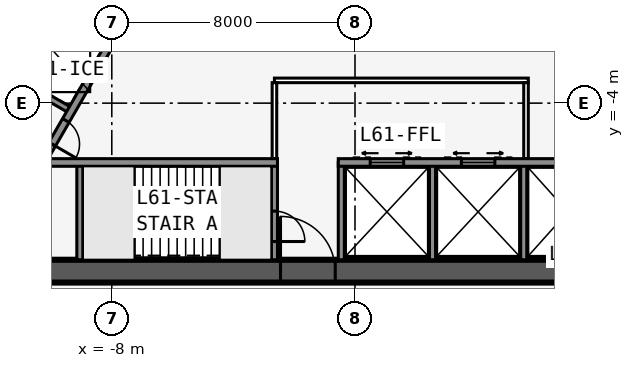
"""IFC4 building model, lengths in metres.
Left out: names, types, materials, properties, quantities, classifications, styles, units other than length and angle.
Written with IfcOpenShell. Run it as: python <this file> out.ifc"""

import sys

from ifc_helpers import new_model, si_unit, direction, frame, frame_2d, origin, place, context, subcontext, project, spatial, rectangle, extrude, element, fill, save


model = new_model("IFC4")
c1 = context("Model", 3, precision=1e-05, world=origin(), true_north=direction((0.0, 1.0)))
c2 = subcontext(c1, "Body", "Model", "MODEL_VIEW")
j1 = project(units=[si_unit("LENGTHUNIT", "METRE"), si_unit("PLANEANGLEUNIT", "RADIAN")], contexts=[c1])
p1 = place(None, origin())
s1 = spatial("IfcSite", under=j1, at=p1, CompositionType="ELEMENT")
p2 = place(p1, origin())
s2 = spatial("IfcBuilding", under=s1, at=p2, CompositionType="ELEMENT")
p3 = place(p2, frame((0.0, 0.0, 229.7)))
s3 = spatial("IfcBuildingStorey", under=s2, at=p3, CompositionType="ELEMENT", Elevation=229.7)
p4 = place(p3, frame((-16.5, -9.526, 0.0), z_axis=(0.0, 0.0, 1.0), x_axis=(1.0, 0.0, 0.0)))
e1 = element("IfcWall", 1, at=p4, inside=s3, PredefinedType="SHEAR", context=c2, shape_type="SweptSolid", body=[
    extrude(rectangle(XDim=33.0, YDim=0.75, at=frame_2d((16.5, 0.0))), origin(), (0.0, 0.0, 1.0), 3.6),
])
p5 = place(p4, frame((14.05, 0.0, 0.0)))
e2 = element("IfcOpeningElement", 2, at=p5, cuts=e1, PredefinedType="OPENING", context=c2, shape_type="SweptSolid", body=[
    extrude(rectangle(XDim=1.8, YDim=2.13, at=frame_2d((0.9, 1.065))), frame((0.0, 0.385, 0.0), z_axis=(0.0, -1.0, 0.0), x_axis=(1.0, 0.0, 0.0)), (0.0, 0.0, 1.0), 0.77),
])
p6 = place(p3, frame((-10.183, -5.951, 0.0), z_axis=(0.0, 0.0, 1.0), x_axis=(1.0, 0.0, 0.0)))
e3 = element("IfcWall", 3, at=p6, inside=s3, PredefinedType="SOLIDWALL", context=c2, shape_type="SweptSolid", body=[
    extrude(rectangle(XDim=7.633, YDim=0.25, at=frame_2d((3.816, 0.0))), origin(), (0.0, 0.0, 1.0), 3.35),
])
p7 = place(p3, frame((-0.55, -5.951, 0.0), z_axis=(0.0, 0.0, 1.0), x_axis=(1.0, 0.0, 0.0)))
e4 = element("IfcWall", 4, at=p7, inside=s3, PredefinedType="SOLIDWALL", context=c2, shape_type="SweptSolid", body=[
    extrude(rectangle(XDim=10.733, YDim=0.25, at=frame_2d((5.366, 0.0))), origin(), (0.0, 0.0, 1.0), 3.35),
])
p8 = place(p7, frame((9.314, 0.0, 0.0)))
e5 = element("IfcOpeningElement", 5, at=p8, cuts=e4, PredefinedType="OPENING", context=c2, shape_type="SweptSolid", body=[
    extrude(rectangle(XDim=0.9, YDim=2.13, at=frame_2d((0.45, 1.065))), frame((0.0, 0.135, 0.0), z_axis=(0.0, -1.0, 0.0), x_axis=(1.0, 0.0, 0.0)), (0.0, 0.0, 1.0), 0.27),
])
p9 = place(p7, frame((1.05, 0.0, 0.0)))
e6 = element("IfcOpeningElement", 6, at=p9, cuts=e4, PredefinedType="OPENING", context=c2, shape_type="SweptSolid", body=[
    extrude(rectangle(XDim=1.1, YDim=2.13, at=frame_2d((0.55, 1.065))), frame((0.0, 0.135, 0.0), z_axis=(0.0, -1.0, 0.0), x_axis=(1.0, 0.0, 0.0)), (0.0, 0.0, 1.0), 0.27),
])
p10 = place(p7, frame((4.05, 0.0, 0.0)))
e7 = element("IfcOpeningElement", 7, at=p10, cuts=e4, PredefinedType="OPENING", context=c2, shape_type="SweptSolid", body=[
    extrude(rectangle(XDim=1.1, YDim=2.13, at=frame_2d((0.55, 1.065))), frame((0.0, 0.135, 0.0), z_axis=(0.0, -1.0, 0.0), x_axis=(1.0, 0.0, 0.0)), (0.0, 0.0, 1.0), 0.27),
])
p11 = place(p3, frame((-9.05, -5.951, 0.0), z_axis=(0.0, 0.0, 1.0), x_axis=(0.0, -1.0, 0.0)))
e8 = element("IfcWall", 8, at=p11, inside=s3, PredefinedType="SOLIDWALL", context=c2, shape_type="SweptSolid", body=[
    extrude(rectangle(XDim=3.2, YDim=0.2, at=frame_2d((1.6, 0.0))), origin(), (0.0, 0.0, 1.0), 3.35),
])
p12 = place(p3, frame((-2.65, -5.951, 0.0), z_axis=(0.0, 0.0, 1.0), x_axis=(0.0, -1.0, 0.0)))
e9 = element("IfcWall", 9, at=p12, inside=s3, PredefinedType="SOLIDWALL", context=c2, shape_type="SweptSolid", body=[
    extrude(rectangle(XDim=3.2, YDim=0.2, at=frame_2d((1.6, 0.0))), origin(), (0.0, 0.0, 1.0), 3.35),
])
p13 = place(p12, frame((1.6, 0.0, 0.0)))
e10 = element("IfcOpeningElement", 10, at=p13, cuts=e9, PredefinedType="OPENING", context=c2, shape_type="SweptSolid", body=[
    extrude(rectangle(XDim=1.0, YDim=2.13, at=frame_2d((0.5, 1.065))), frame((0.0, 0.11, 0.0), z_axis=(0.0, -1.0, 0.0), x_axis=(1.0, 0.0, 0.0)), (0.0, 0.0, 1.0), 0.22),
])
for number, where, z_axis, x_axis in (
    (11, (-0.45, -5.951, 0.0), (0.0, 0.0, 1.0), (0.0, -1.0, 0.0)),
    (12, (2.55, -5.951, 0.0), (0.0, 0.0, 1.0), (0.0, -1.0, 0.0)),
    (13, (5.55, -5.951, 0.0), (0.0, 0.0, 1.0), (0.0, -1.0, 0.0)),
):
    element("IfcWall", number, at=place(p3, frame(where, z_axis=z_axis, x_axis=x_axis)), inside=s3, PredefinedType="SOLIDWALL", context=c2, shape_type="SweptSolid", body=[
        extrude(rectangle(XDim=3.2, YDim=0.2, at=frame_2d((1.6, 0.0))), origin(), (0.0, 0.0, 1.0), 3.35),
    ])
p14 = place(p3, frame((16.5, -9.526, 0.0), z_axis=(0.0, 0.0, 1.0), x_axis=(-0.499999749417, 0.866025548458, 0.0)))
e14 = element("IfcWall", 14, at=p14, inside=s3, PredefinedType="SHEAR", context=c2, shape_type="SweptSolid", body=[
    extrude(rectangle(XDim=33.0, YDim=0.75, at=frame_2d((16.5, 0.0))), origin(), (0.0, 0.0, 1.0), 3.6),
])
p15 = place(p14, frame((14.15, 0.0, 0.0)))
e15 = element("IfcOpeningElement", 15, at=p15, cuts=e14, PredefinedType="OPENING", context=c2, shape_type="SweptSolid", body=[
    extrude(rectangle(XDim=1.8, YDim=2.13, at=frame_2d((0.9, 1.065))), frame((0.0, 0.385, 0.0), z_axis=(0.0, -1.0, 0.0), x_axis=(1.0, 0.0, 0.0)), (0.0, 0.0, 1.0), 0.77),
])
p16 = place(p14, frame((12.6, 0.0, 0.0)))
e16 = element("IfcOpeningElement", 16, at=p16, cuts=e14, PredefinedType="OPENING", context=c2, shape_type="SweptSolid", body=[
    extrude(rectangle(XDim=1.0, YDim=2.13, at=frame_2d((0.5, 1.065))), frame((0.0, 0.385, 0.0), z_axis=(0.0, -1.0, 0.0), x_axis=(1.0, 0.0, 0.0)), (0.0, 0.0, 1.0), 0.77),
])
p17 = place(p3, frame((10.245, -5.843, 0.0), z_axis=(0.0, 0.0, 1.0), x_axis=(-0.499993009313, 0.866029439822, 0.0)))
e17 = element("IfcWall", 17, at=p17, inside=s3, PredefinedType="SOLIDWALL", context=c2, shape_type="SweptSolid", body=[
    extrude(rectangle(XDim=7.733, YDim=0.25, at=frame_2d((3.866, 0.0))), origin(), (0.0, 0.0, 1.0), 3.35),
])
p18 = place(p3, frame((0.0, 19.052, 0.0), z_axis=(0.0, 0.0, 1.0), x_axis=(-0.499999749417, -0.866025548458, 0.0)))
e18 = element("IfcWall", 18, at=p18, inside=s3, PredefinedType="SHEAR", context=c2, shape_type="SweptSolid", body=[
    extrude(rectangle(XDim=33.0, YDim=0.75, at=frame_2d((16.5, 0.0))), origin(), (0.0, 0.0, 1.0), 3.6),
])
p19 = place(p18, frame((14.15, 0.0, 0.0)))
e19 = element("IfcOpeningElement", 19, at=p19, cuts=e18, PredefinedType="OPENING", context=c2, shape_type="SweptSolid", body=[
    extrude(rectangle(XDim=1.8, YDim=2.13, at=frame_2d((0.9, 1.065))), frame((0.0, 0.385, 0.0), z_axis=(0.0, -1.0, 0.0), x_axis=(1.0, 0.0, 0.0)), (0.0, 0.0, 1.0), 0.77),
])
p20 = place(p18, frame((12.6, 0.0, 0.0)))
e20 = element("IfcOpeningElement", 20, at=p20, cuts=e18, PredefinedType="OPENING", context=c2, shape_type="SweptSolid", body=[
    extrude(rectangle(XDim=1.0, YDim=2.13, at=frame_2d((0.5, 1.065))), frame((0.0, 0.385, 0.0), z_axis=(0.0, -1.0, 0.0), x_axis=(1.0, 0.0, 0.0)), (0.0, 0.0, 1.0), 0.77),
])
p21 = place(p3, frame((-4.929, 3.365, 0.0), z_axis=(0.0, 0.0, 1.0), x_axis=(-0.499991433582, -0.866030349552, 0.0)))
e21 = element("IfcWall", 21, at=p21, inside=s3, PredefinedType="SOLIDWALL", context=c2, shape_type="SweptSolid", body=[
    extrude(rectangle(XDim=10.633, YDim=0.25, at=frame_2d((5.316, 0.0))), origin(), (0.0, 0.0, 1.0), 3.35),
])
p22 = place(p21, frame((9.164, 0.0, 0.0)))
e22 = element("IfcOpeningElement", 22, at=p22, cuts=e21, PredefinedType="OPENING", context=c2, shape_type="SweptSolid", body=[
    extrude(rectangle(XDim=0.9, YDim=2.13, at=frame_2d((0.45, 1.065))), frame((0.0, 0.135, 0.0), z_axis=(0.0, -1.0, 0.0), x_axis=(1.0, 0.0, 0.0)), (0.0, 0.0, 1.0), 0.27),
])
p23 = place(p21, frame((1.1, 0.0, 0.0)))
e23 = element("IfcOpeningElement", 23, at=p23, cuts=e21, PredefinedType="OPENING", context=c2, shape_type="SweptSolid", body=[
    extrude(rectangle(XDim=0.9, YDim=2.13, at=frame_2d((0.45, 1.065))), frame((0.0, 0.135, 0.0), z_axis=(0.0, -1.0, 0.0), x_axis=(1.0, 0.0, 0.0)), (0.0, 0.0, 1.0), 0.27),
])
p24 = place(p21, frame((4.0, 0.0, 0.0)))
e24 = element("IfcOpeningElement", 24, at=p24, cuts=e21, PredefinedType="OPENING", context=c2, shape_type="SweptSolid", body=[
    extrude(rectangle(XDim=0.9, YDim=2.13, at=frame_2d((0.45, 1.065))), frame((0.0, 0.135, 0.0), z_axis=(0.0, -1.0, 0.0), x_axis=(1.0, 0.0, 0.0)), (0.0, 0.0, 1.0), 0.27),
])
p25 = place(p3, frame((-9.329, -4.256, 0.0), z_axis=(0.0, 0.0, 1.0), x_axis=(-0.866022944154, 0.50000426018, 0.0)))
e25 = element("IfcWall", 25, at=p25, inside=s3, PredefinedType="SOLIDWALL", context=c2, shape_type="SweptSolid", body=[
    extrude(rectangle(XDim=3.2, YDim=0.2, at=frame_2d((1.6, 0.0))), origin(), (0.0, 0.0, 1.0), 3.35),
])
p26 = place(p3, frame((20.102, -11.115, 0.0), z_axis=(0.0, 0.0, 1.0), x_axis=(-0.500000265775, 0.866025250339, 0.0)))
e26 = element("IfcWall", 26, at=p26, inside=s3, PredefinedType="PARTITIONING", context=c2, shape_type="SweptSolid", body=[
    extrude(rectangle(XDim=39.354, YDim=0.15, at=frame_2d((19.677, 0.0))), origin(), (0.0, 0.0, 1.0), 3.35),
])
p27 = place(p26, frame((1.102, 0.0, 0.0)))
e27 = element("IfcOpeningElement", 27, at=p27, cuts=e26, PredefinedType="OPENING", context=c2, shape_type="SweptSolid", body=[
    extrude(rectangle(XDim=0.95, YDim=2.13, at=frame_2d((0.475, 1.065))), frame((0.0, 0.085, 0.0), z_axis=(0.0, -1.0, 0.0), x_axis=(1.0, 0.0, 0.0)), (0.0, 0.0, 1.0), 0.17),
])
p28 = place(p26, frame((11.702, 0.0, 0.0)))
e28 = element("IfcOpeningElement", 28, at=p28, cuts=e26, PredefinedType="OPENING", context=c2, shape_type="SweptSolid", body=[
    extrude(rectangle(XDim=0.95, YDim=2.13, at=frame_2d((0.475, 1.065))), frame((0.0, 0.085, 0.0), z_axis=(0.0, -1.0, 0.0), x_axis=(1.0, 0.0, 0.0)), (0.0, 0.0, 1.0), 0.17),
])
p29 = place(p26, frame((26.702, 0.0, 0.0)))
e29 = element("IfcOpeningElement", 29, at=p29, cuts=e26, PredefinedType="OPENING", context=c2, shape_type="SweptSolid", body=[
    extrude(rectangle(XDim=0.95, YDim=2.13, at=frame_2d((0.475, 1.065))), frame((0.0, 0.085, 0.0), z_axis=(0.0, -1.0, 0.0), x_axis=(1.0, 0.0, 0.0)), (0.0, 0.0, 1.0), 0.17),
])
p30 = place(p26, frame((37.302, 0.0, 0.0)))
e30 = element("IfcOpeningElement", 30, at=p30, cuts=e26, PredefinedType="OPENING", context=c2, shape_type="SweptSolid", body=[
    extrude(rectangle(XDim=0.95, YDim=2.13, at=frame_2d((0.475, 1.065))), frame((0.0, 0.085, 0.0), z_axis=(0.0, -1.0, 0.0), x_axis=(1.0, 0.0, 0.0)), (0.0, 0.0, 1.0), 0.17),
])
p31 = place(p3, frame((-0.425, 22.966, 0.0), z_axis=(0.0, 0.0, 1.0), x_axis=(-0.500000265775, -0.866025250339, 0.0)))
e31 = element("IfcWall", 31, at=p31, inside=s3, PredefinedType="PARTITIONING", context=c2, shape_type="SweptSolid", body=[
    extrude(rectangle(XDim=39.354, YDim=0.15, at=frame_2d((19.677, 0.0))), origin(), (0.0, 0.0, 1.0), 3.35),
])
p32 = place(p31, frame((1.665, 0.0, 0.0)))
e32 = element("IfcOpeningElement", 32, at=p32, cuts=e31, PredefinedType="OPENING", context=c2, shape_type="SweptSolid", body=[
    extrude(rectangle(XDim=0.95, YDim=2.13, at=frame_2d((0.475, 1.065))), frame((0.0, 0.085, 0.0), z_axis=(0.0, -1.0, 0.0), x_axis=(1.0, 0.0, 0.0)), (0.0, 0.0, 1.0), 0.17),
])
p33 = place(p31, frame((11.702, 0.0, 0.0)))
e33 = element("IfcOpeningElement", 33, at=p33, cuts=e31, PredefinedType="OPENING", context=c2, shape_type="SweptSolid", body=[
    extrude(rectangle(XDim=0.95, YDim=2.13, at=frame_2d((0.475, 1.065))), frame((0.0, 0.085, 0.0), z_axis=(0.0, -1.0, 0.0), x_axis=(1.0, 0.0, 0.0)), (0.0, 0.0, 1.0), 0.17),
])
p34 = place(p31, frame((21.702, 0.0, 0.0)))
e34 = element("IfcOpeningElement", 34, at=p34, cuts=e31, PredefinedType="OPENING", context=c2, shape_type="SweptSolid", body=[
    extrude(rectangle(XDim=0.95, YDim=2.13, at=frame_2d((0.475, 1.065))), frame((0.0, 0.085, 0.0), z_axis=(0.0, -1.0, 0.0), x_axis=(1.0, 0.0, 0.0)), (0.0, 0.0, 1.0), 0.17),
])
p35 = place(p31, frame((36.739, 0.0, 0.0)))
e35 = element("IfcOpeningElement", 35, at=p35, cuts=e31, PredefinedType="OPENING", context=c2, shape_type="SweptSolid", body=[
    extrude(rectangle(XDim=0.95, YDim=2.13, at=frame_2d((0.475, 1.065))), frame((0.0, 0.085, 0.0), z_axis=(0.0, -1.0, 0.0), x_axis=(1.0, 0.0, 0.0)), (0.0, 0.0, 1.0), 0.17),
])
p36 = place(p3, frame((-2.65, -3.251, 0.0), z_axis=(0.0, 0.0, 1.0), x_axis=(1.0, 0.0, 0.0)))
e36 = element("IfcWall", 36, at=p36, inside=s3, PredefinedType="PARTITIONING", context=c2, shape_type="SweptSolid", body=[
    extrude(rectangle(XDim=8.35, YDim=0.15, at=frame_2d((4.175, 0.0))), origin(), (0.0, 0.0, 1.0), 3.35),
])
for number, where, z_axis, x_axis in (
    (37, (-2.65, -5.826, 0.0), (0.0, 0.0, 1.0), (0.0, 1.0, 0.0)),
    (38, (5.625, -5.826, 0.0), (0.0, 0.0, 1.0), (0.0, 1.0, 0.0)),
):
    element("IfcWall", number, at=place(p3, frame(where, z_axis=z_axis, x_axis=x_axis)), inside=s3, PredefinedType="PARTITIONING", context=c2, shape_type="SweptSolid", body=[
        extrude(rectangle(XDim=2.5, YDim=0.15, at=frame_2d((1.25, 0.0))), origin(), (0.0, 0.0, 1.0), 3.35),
    ])
p37 = place(p3, frame((-7.247, -7.576, 0.0), z_axis=(0.0, 0.0, 1.0), x_axis=(1.0, 0.0, 0.0)))
e39 = element("IfcWall", 39, at=p37, inside=s3, PredefinedType="SOLIDWALL", context=c2, shape_type="SweptSolid", body=[
    extrude(rectangle(XDim=2.794, YDim=0.1, at=frame_2d((1.397, 0.0))), origin(), (0.0, 0.0, 1.0), 3.6),
])
p38 = place(p5, origin())
e40 = element("IfcDoor", 40, at=p38, inside=s3, OperationType="DOUBLE_DOOR_SINGLE_SWING", PredefinedType="DOOR", context=c2, shape_type="SweptSolid", body=[
    extrude(rectangle(XDim=1.8, YDim=2.13, at=frame_2d((0.9, 1.065))), frame((0.0, 0.025, 0.0), z_axis=(0.0, -1.0, 0.0), x_axis=(1.0, 0.0, 0.0)), (0.0, 0.0, 1.0), 0.05),
])
fill(e2, e40)
p39 = place(p13, origin())
e41 = element("IfcDoor", 41, at=p39, inside=s3, OperationType="SINGLE_SWING_RIGHT", PredefinedType="DOOR", context=c2, shape_type="SweptSolid", body=[
    extrude(rectangle(XDim=1.0, YDim=2.13, at=frame_2d((0.5, 1.065))), frame((0.0, 0.025, 0.0), z_axis=(0.0, -1.0, 0.0), x_axis=(1.0, 0.0, 0.0)), (0.0, 0.0, 1.0), 0.05),
])
fill(e10, e41)
p40 = place(p22, origin())
e42 = element("IfcDoor", 42, at=p40, inside=s3, OperationType="SINGLE_SWING_RIGHT", PredefinedType="DOOR", context=c2, shape_type="SweptSolid", body=[
    extrude(rectangle(XDim=0.9, YDim=2.13, at=frame_2d((0.45, 1.065))), frame((0.0, 0.025, 0.0), z_axis=(0.0, -1.0, 0.0), x_axis=(1.0, 0.0, 0.0)), (0.0, 0.0, 1.0), 0.05),
])
fill(e22, e42)
p41 = place(p9, origin())
e43 = element("IfcDoor", 43, at=p41, inside=s3, OperationType="DOUBLE_DOOR_SLIDING", PredefinedType="USERDEFINED", context=c2, shape_type="SweptSolid", body=[
    extrude(rectangle(XDim=1.1, YDim=2.13, at=frame_2d((0.55, 1.065))), frame((0.0, 0.025, 0.0), z_axis=(0.0, -1.0, 0.0), x_axis=(1.0, 0.0, 0.0)), (0.0, 0.0, 1.0), 0.05),
])
fill(e6, e43)
p42 = place(p10, origin())
e44 = element("IfcDoor", 44, at=p42, inside=s3, OperationType="DOUBLE_DOOR_SLIDING", PredefinedType="USERDEFINED", context=c2, shape_type="SweptSolid", body=[
    extrude(rectangle(XDim=1.1, YDim=2.13, at=frame_2d((0.55, 1.065))), frame((0.0, 0.025, 0.0), z_axis=(0.0, -1.0, 0.0), x_axis=(1.0, 0.0, 0.0)), (0.0, 0.0, 1.0), 0.05),
])
fill(e7, e44)
save(model, sys.argv[1])
